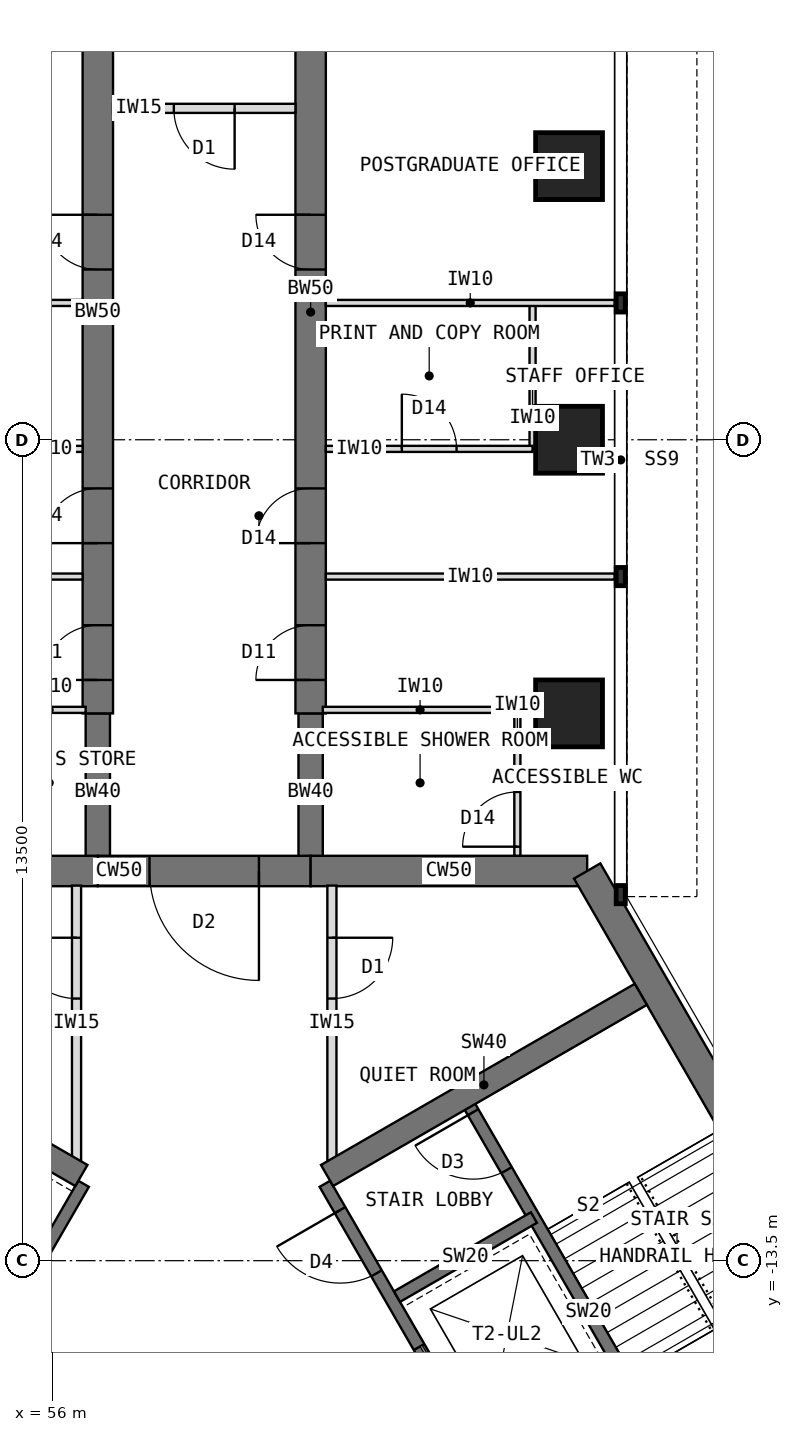
"""IFC4 building model, lengths in metres.
Left out: names, types, materials, properties, quantities, classifications, styles, units other than length and angle.
Written with IfcOpenShell. Run it as: python <this file> out.ifc"""

import sys

from ifc_helpers import new_model, si_unit, direction, frame, frame_2d, origin, origin_2d, place, context, subcontext, project, spatial, rectangle, extrude, element, fill, save


model = new_model("IFC4")
c1 = context("Model", 3, precision=1e-05, world=origin(), true_north=direction((0.0, 1.0)))
c2 = subcontext(c1, "Body", "Model", "MODEL_VIEW")
j1 = project(units=[si_unit("LENGTHUNIT", "METRE"), si_unit("PLANEANGLEUNIT", "RADIAN")], contexts=[c1])
p1 = place(None, origin())
s1 = spatial("IfcSite", under=j1, at=p1, CompositionType="ELEMENT")
p2 = place(p1, origin())
s2 = spatial("IfcBuilding", under=s1, at=p2, CompositionType="ELEMENT")
p3 = place(p2, frame((0.0, 0.0, 234.5)))
s3 = spatial("IfcBuildingStorey", under=s2, at=p3, CompositionType="ELEMENT", Elevation=234.5)
p4 = place(p3, frame((64.798, -7.092, 0.0), z_axis=(0.0, 0.0, 1.0), x_axis=(-1.0, 0.0, 0.0)))
e1 = element("IfcWall", 1, at=p4, inside=s3, PredefinedType="SHEAR", context=c2, shape_type="SweptSolid", body=[
    extrude(rectangle(XDim=4.548, YDim=0.5, at=frame_2d((2.274, 0.0))), origin(), (0.0, 0.0, 1.0), 4.0),
])
p5 = place(p3, frame((60.25, -7.092, 0.0), z_axis=(0.0, 0.0, 1.0), x_axis=(-1.0, 0.0, 0.0)))
e2 = element("IfcWall", 2, at=p5, inside=s3, PredefinedType="SHEAR", context=c2, shape_type="SweptSolid", body=[
    extrude(rectangle(XDim=3.5, YDim=0.5, at=frame_2d((1.75, 0.0))), origin(), (0.0, 0.0, 1.0), 4.0),
])
p6 = place(p5, frame((0.85, 0.0, 0.0)))
e3 = element("IfcOpeningElement", 3, at=p6, cuts=e2, PredefinedType="OPENING", context=c2, shape_type="SweptSolid", body=[
    extrude(rectangle(XDim=1.8, YDim=2.1, at=frame_2d((0.9, 1.05))), frame((0.0, 0.26, 0.0), z_axis=(0.0, -1.0, 0.0), x_axis=(1.0, 0.0, 0.0)), (0.0, 0.0, 1.0), 0.52),
])
p7 = place(p3, frame((56.75, -7.092, 0.0), z_axis=(0.0, 0.0, 1.0), x_axis=(-1.0, 0.0, 0.0)))
e4 = element("IfcWall", 4, at=p7, inside=s3, PredefinedType="SHEAR", context=c2, shape_type="SweptSolid", body=[
    extrude(rectangle(XDim=4.548, YDim=0.5, at=frame_2d((2.274, 0.0))), origin(), (0.0, 0.0, 1.0), 4.0),
])
p8 = place(p3, frame((71.096, -18.0, 0.0), z_axis=(0.0, 0.0, 1.0), x_axis=(-0.500005998175, 0.866021940709, 0.0)))
e5 = element("IfcWall", 5, at=p8, inside=s3, PredefinedType="SHEAR", context=c2, shape_type="SweptSolid", body=[
    extrude(rectangle(XDim=12.596, YDim=0.5, at=frame_2d((6.298, 0.0))), origin(), (0.0, 0.0, 1.0), 4.0),
])
p9 = place(p3, frame((56.75, -7.092, 0.0), z_axis=(0.0, 0.0, 1.0), x_axis=(0.0, 1.0, 0.0)))
e6 = element("IfcWall", 6, at=p9, inside=s3, PredefinedType="SHEAR", context=c2, shape_type="SweptSolid", body=[
    extrude(rectangle(XDim=2.592, YDim=0.4, at=frame_2d((1.296, 0.0))), origin(), (0.0, 0.0, 1.0), 4.0),
])
p10 = place(p3, frame((56.75, -4.5, 0.0), z_axis=(0.0, 0.0, 1.0), x_axis=(0.0, 1.0, 0.0)))
e7 = element("IfcWall", 7, at=p10, inside=s3, PredefinedType="SHEAR", context=c2, shape_type="SweptSolid", body=[
    extrude(rectangle(XDim=13.2, YDim=0.5, at=frame_2d((6.6, 0.0))), origin(), (0.0, 0.0, 1.0), 4.0),
])
p11 = place(p10, frame((0.55, 0.0, 0.0)))
e8 = element("IfcOpeningElement", 8, at=p11, cuts=e7, PredefinedType="OPENING", context=c2, shape_type="SweptSolid", body=[
    extrude(rectangle(XDim=0.9, YDim=2.1, at=frame_2d((0.45, 1.05))), frame((0.0, 0.26, 0.0), z_axis=(0.0, -1.0, 0.0), x_axis=(1.0, 0.0, 0.0)), (0.0, 0.0, 1.0), 0.52),
])
p12 = place(p10, frame((2.8, 0.0, 0.0)))
e9 = element("IfcOpeningElement", 9, at=p12, cuts=e7, PredefinedType="OPENING", context=c2, shape_type="SweptSolid", body=[
    extrude(rectangle(XDim=0.9, YDim=2.1, at=frame_2d((0.45, 1.05))), frame((0.0, 0.26, 0.0), z_axis=(0.0, -1.0, 0.0), x_axis=(1.0, 0.0, 0.0)), (0.0, 0.0, 1.0), 0.52),
])
p13 = place(p10, frame((7.3, 0.0, 0.0)))
e10 = element("IfcOpeningElement", 10, at=p13, cuts=e7, PredefinedType="OPENING", context=c2, shape_type="SweptSolid", body=[
    extrude(rectangle(XDim=0.9, YDim=2.1, at=frame_2d((0.45, 1.05))), frame((0.0, 0.26, 0.0), z_axis=(0.0, -1.0, 0.0), x_axis=(1.0, 0.0, 0.0)), (0.0, 0.0, 1.0), 0.52),
])
p14 = place(p3, frame((60.25, -7.092, 0.0), z_axis=(0.0, 0.0, 1.0), x_axis=(0.0, 1.0, 0.0)))
e11 = element("IfcWall", 11, at=p14, inside=s3, PredefinedType="SHEAR", context=c2, shape_type="SweptSolid", body=[
    extrude(rectangle(XDim=2.592, YDim=0.4, at=frame_2d((1.296, 0.0))), origin(), (0.0, 0.0, 1.0), 4.0),
])
p15 = place(p3, frame((60.25, -4.5, 0.0), z_axis=(0.0, 0.0, 1.0), x_axis=(0.0, 1.0, 0.0)))
e12 = element("IfcWall", 12, at=p15, inside=s3, PredefinedType="SHEAR", context=c2, shape_type="SweptSolid", body=[
    extrude(rectangle(XDim=13.2, YDim=0.5, at=frame_2d((6.6, 0.0))), origin(), (0.0, 0.0, 1.0), 4.0),
])
p16 = place(p15, frame((0.55, 0.0, 0.0)))
e13 = element("IfcOpeningElement", 13, at=p16, cuts=e12, PredefinedType="OPENING", context=c2, shape_type="SweptSolid", body=[
    extrude(rectangle(XDim=0.9, YDim=2.1, at=frame_2d((0.45, 1.05))), frame((0.0, 0.26, 0.0), z_axis=(0.0, -1.0, 0.0), x_axis=(1.0, 0.0, 0.0)), (0.0, 0.0, 1.0), 0.52),
])
p17 = place(p15, frame((2.8, 0.0, 0.0)))
e14 = element("IfcOpeningElement", 14, at=p17, cuts=e12, PredefinedType="OPENING", context=c2, shape_type="SweptSolid", body=[
    extrude(rectangle(XDim=0.9, YDim=2.1, at=frame_2d((0.45, 1.05))), frame((0.0, 0.26, 0.0), z_axis=(0.0, -1.0, 0.0), x_axis=(1.0, 0.0, 0.0)), (0.0, 0.0, 1.0), 0.52),
])
p18 = place(p15, frame((7.3, 0.0, 0.0)))
e15 = element("IfcOpeningElement", 15, at=p18, cuts=e12, PredefinedType="OPENING", context=c2, shape_type="SweptSolid", body=[
    extrude(rectangle(XDim=0.9, YDim=2.1, at=frame_2d((0.45, 1.05))), frame((0.0, 0.26, 0.0), z_axis=(0.0, -1.0, 0.0), x_axis=(1.0, 0.0, 0.0)), (0.0, 0.0, 1.0), 0.52),
])
for number, where, z_axis, x_axis in (
    (16, (64.5, -4.5, 0.0), (0.0, 0.0, 1.0), (1.0, 0.0, 0.0)),
    (17, (64.5, 0.0, 0.0), (0.0, 0.0, 1.0), (1.0, 0.0, 0.0)),
    (18, (64.5, 4.5, 0.0), (0.0, 0.0, 1.0), (1.0, 0.0, 0.0)),
):
    element("IfcColumn", number, at=place(p3, frame(where, z_axis=z_axis, x_axis=x_axis)), inside=s3, PredefinedType="COLUMN", context=c2, shape_type="SweptSolid", body=[
        extrude(rectangle(XDim=1.1, YDim=1.1, at=origin_2d()), origin(), (0.0, 0.0, 1.0), 4.0),
    ])
p19 = place(p3, frame((56.516, -12.236, 0.0), z_axis=(0.0, 0.0, 1.0), x_axis=(-0.49999894854, -0.866026010844, 0.0)))
e19 = element("IfcWall", 19, at=p19, inside=s3, PredefinedType="SHEAR", context=c2, shape_type="SweptSolid", body=[
    extrude(rectangle(XDim=8.0, YDim=0.2, at=frame_2d((4.0, 0.0))), origin(), (0.0, 0.0, 1.0), 4.0),
])
p20 = place(p19, frame((6.3, 0.0, 0.0)))
e20 = element("IfcOpeningElement", 20, at=p20, cuts=e19, PredefinedType="OPENING", context=c2, shape_type="SweptSolid", body=[
    extrude(rectangle(XDim=1.2, YDim=2.1, at=frame_2d((0.6, 1.05))), frame((0.0, 0.11, 0.0), z_axis=(0.0, -1.0, 0.0), x_axis=(1.0, 0.0, 0.0)), (0.0, 0.0, 1.0), 0.22),
])
p21 = place(p3, frame((56.48, -12.099, 0.0), z_axis=(0.0, 0.0, 1.0), x_axis=(-0.86602319114, 0.500003832394, 0.0)))
e21 = element("IfcWall", 21, at=p21, inside=s3, PredefinedType="SHEAR", context=c2, shape_type="SweptSolid", body=[
    extrude(rectangle(XDim=5.958, YDim=0.4, at=frame_2d((2.979, 0.0))), origin(), (0.0, 0.0, 1.0), 4.0),
])
p22 = place(p3, frame((64.484, -19.164, 0.0), z_axis=(0.0, 0.0, 1.0), x_axis=(-0.49999894854, 0.866026010844, 0.0)))
e22 = element("IfcWall", 22, at=p22, inside=s3, PredefinedType="SHEAR", context=c2, shape_type="SweptSolid", body=[
    extrude(rectangle(XDim=8.0, YDim=0.2, at=frame_2d((4.0, 0.0))), origin(), (0.0, 0.0, 1.0), 4.0),
])
p23 = place(p22, frame((6.3, 0.0, 0.0)))
e23 = element("IfcOpeningElement", 23, at=p23, cuts=e22, PredefinedType="OPENING", context=c2, shape_type="SweptSolid", body=[
    extrude(rectangle(XDim=1.2, YDim=2.1, at=frame_2d((0.6, 1.05))), frame((0.0, 0.11, 0.0), z_axis=(0.0, -1.0, 0.0), x_axis=(1.0, 0.0, 0.0)), (0.0, 0.0, 1.0), 0.22),
])
p24 = place(p22, frame((0.9, 0.0, 0.0)))
e24 = element("IfcOpeningElement", 24, at=p24, cuts=e22, PredefinedType="OPENING", context=c2, shape_type="SweptSolid", body=[
    extrude(rectangle(XDim=1.1, YDim=2.2, at=frame_2d((0.55, 1.1))), frame((0.0, 0.11, 0.0), z_axis=(0.0, -1.0, 0.0), x_axis=(1.0, 0.0, 0.0)), (0.0, 0.0, 1.0), 0.22),
])
p25 = place(p22, frame((3.8, 0.0, 0.0)))
e25 = element("IfcOpeningElement", 25, at=p25, cuts=e22, PredefinedType="OPENING", context=c2, shape_type="SweptSolid", body=[
    extrude(rectangle(XDim=1.1, YDim=2.2, at=frame_2d((0.55, 1.1))), frame((0.0, 0.11, 0.0), z_axis=(0.0, -1.0, 0.0), x_axis=(1.0, 0.0, 0.0)), (0.0, 0.0, 1.0), 0.22),
])
p26 = place(p3, frame((61.67, -14.091, 0.0), z_axis=(0.0, 0.0, 1.0), x_axis=(0.86603858612, 0.49997716683, 0.0)))
e26 = element("IfcWall", 26, at=p26, inside=s3, PredefinedType="SHEAR", context=c2, shape_type="SweptSolid", body=[
    extrude(rectangle(XDim=2.6, YDim=0.2, at=frame_2d((1.3, 0.0))), origin(), (0.0, 0.0, 1.0), 4.0),
])
p27 = place(p3, frame((66.822, -17.814, 0.0), z_axis=(0.0, 0.0, 1.0), x_axis=(-0.49999894854, 0.866026010844, 0.0)))
e27 = element("IfcWall", 27, at=p27, inside=s3, PredefinedType="SHEAR", context=c2, shape_type="SweptSolid", body=[
    extrude(rectangle(XDim=8.0, YDim=0.2, at=frame_2d((4.0, 0.0))), origin(), (0.0, 0.0, 1.0), 4.0),
])
p28 = place(p27, frame((6.7, 0.0, 0.0)))
e28 = element("IfcOpeningElement", 28, at=p28, cuts=e27, PredefinedType="OPENING", context=c2, shape_type="SweptSolid", body=[
    extrude(rectangle(XDim=1.1, YDim=2.1, at=frame_2d((0.55, 1.05))), frame((0.0, 0.11, 0.0), z_axis=(0.0, -1.0, 0.0), x_axis=(1.0, 0.0, 0.0)), (0.0, 0.0, 1.0), 0.22),
])
p29 = place(p3, frame((60.52, -12.099, 0.0), z_axis=(0.0, 0.0, 1.0), x_axis=(0.86602319114, 0.500003832394, 0.0)))
e29 = element("IfcWall", 29, at=p29, inside=s3, PredefinedType="SHEAR", context=c2, shape_type="SweptSolid", body=[
    extrude(rectangle(XDim=5.958, YDim=0.4, at=frame_2d((2.979, 0.0))), origin(), (0.0, 0.0, 1.0), 4.0),
])
for number, where, z_axis, x_axis in (
    (30, (56.5, -2.25, 0.0), (0.0, 0.0, 1.0), (-1.0, 0.0, 0.0)),
    (31, (56.5, 2.25, 0.0), (0.0, 0.0, 1.0), (-1.0, 0.0, 0.0)),
):
    element("IfcWall", number, at=place(p3, frame(where, z_axis=z_axis, x_axis=x_axis)), inside=s3, PredefinedType="PARTITIONING", context=c2, shape_type="SweptSolid", body=[
        extrude(rectangle(XDim=4.75, YDim=0.1, at=frame_2d((2.375, 0.0))), origin(), (0.0, 0.0, 1.0), 3.7),
    ])
p30 = place(p3, frame((56.5, -0.15, 0.0), z_axis=(0.0, 0.0, 1.0), x_axis=(-1.0, 0.0, 0.0)))
e32 = element("IfcWall", 32, at=p30, inside=s3, PredefinedType="PARTITIONING", context=c2, shape_type="SweptSolid", body=[
    extrude(rectangle(XDim=3.4, YDim=0.1, at=frame_2d((1.7, 0.0))), origin(), (0.0, 0.0, 1.0), 3.7),
])
p31 = place(p30, frame((1.25, 0.0, 0.0)))
e33 = element("IfcOpeningElement", 33, at=p31, cuts=e32, PredefinedType="OPENING", context=c2, shape_type="SweptSolid", body=[
    extrude(rectangle(XDim=0.9, YDim=2.1, at=frame_2d((0.45, 1.05))), frame((0.0, 0.06, 0.0), z_axis=(0.0, -1.0, 0.0), x_axis=(1.0, 0.0, 0.0)), (0.0, 0.0, 1.0), 0.12),
])
p32 = place(p3, frame((56.55, -4.442, 0.0), z_axis=(0.0, 0.0, 1.0), x_axis=(-1.0, 0.0, 0.0)))
e34 = element("IfcWall", 34, at=p32, inside=s3, PredefinedType="PARTITIONING", context=c2, shape_type="SweptSolid", body=[
    extrude(rectangle(XDim=1.2, YDim=0.1, at=frame_2d((0.6, 0.0))), origin(), (0.0, 0.0, 1.0), 3.167),
])
for number, where, z_axis, x_axis in (
    (35, (60.5, -2.25, 0.0), (0.0, 0.0, 1.0), (1.0, 0.0, 0.0)),
    (36, (60.5, 2.25, 0.0), (0.0, 0.0, 1.0), (1.0, 0.0, 0.0)),
):
    element("IfcWall", number, at=place(p3, frame(where, z_axis=z_axis, x_axis=x_axis)), inside=s3, PredefinedType="PARTITIONING", context=c2, shape_type="SweptSolid", body=[
        extrude(rectangle(XDim=4.75, YDim=0.1, at=frame_2d((2.375, 0.0))), origin(), (0.0, 0.0, 1.0), 3.7),
    ])
p33 = place(p3, frame((63.9, -0.15, 0.0), z_axis=(0.0, 0.0, 1.0), x_axis=(0.0, 1.0, 0.0)))
e37 = element("IfcWall", 37, at=p33, inside=s3, PredefinedType="PARTITIONING", context=c2, shape_type="SweptSolid", body=[
    extrude(rectangle(XDim=2.4, YDim=0.1, at=frame_2d((1.2, 0.0))), origin(), (0.0, 0.0, 1.0), 3.7),
])
p34 = place(p3, frame((60.5, -0.15, 0.0), z_axis=(0.0, 0.0, 1.0), x_axis=(1.0, 0.0, 0.0)))
e38 = element("IfcWall", 38, at=p34, inside=s3, PredefinedType="PARTITIONING", context=c2, shape_type="SweptSolid", body=[
    extrude(rectangle(XDim=3.4, YDim=0.1, at=frame_2d((1.7, 0.0))), origin(), (0.0, 0.0, 1.0), 3.7),
])
p35 = place(p34, frame((1.25, 0.0, 0.0)))
e39 = element("IfcOpeningElement", 39, at=p35, cuts=e38, PredefinedType="OPENING", context=c2, shape_type="SweptSolid", body=[
    extrude(rectangle(XDim=0.9, YDim=2.1, at=frame_2d((0.45, 1.05))), frame((0.0, 0.06, 0.0), z_axis=(0.0, -1.0, 0.0), x_axis=(1.0, 0.0, 0.0)), (0.0, 0.0, 1.0), 0.12),
])
p36 = place(p3, frame((63.65, -6.842, 0.0), z_axis=(0.0, 0.0, 1.0), x_axis=(0.0, 1.0, 0.0)))
e40 = element("IfcWall", 40, at=p36, inside=s3, PredefinedType="PARTITIONING", context=c2, shape_type="SweptSolid", body=[
    extrude(rectangle(XDim=2.4, YDim=0.1, at=frame_2d((1.2, 0.0))), origin(), (0.0, 0.0, 1.0), 3.7),
])
p37 = place(p36, frame((0.15, 0.0, 0.0)))
e41 = element("IfcOpeningElement", 41, at=p37, cuts=e40, PredefinedType="OPENING", context=c2, shape_type="SweptSolid", body=[
    extrude(rectangle(XDim=0.9, YDim=2.1, at=frame_2d((0.45, 1.05))), frame((0.0, 0.06, 0.0), z_axis=(0.0, -1.0, 0.0), x_axis=(1.0, 0.0, 0.0)), (0.0, 0.0, 1.0), 0.12),
])
p38 = place(p3, frame((60.45, -4.442, 0.0), z_axis=(0.0, 0.0, 1.0), x_axis=(1.0, 0.0, 0.0)))
e42 = element("IfcWall", 42, at=p38, inside=s3, PredefinedType="PARTITIONING", context=c2, shape_type="SweptSolid", body=[
    extrude(rectangle(XDim=3.2, YDim=0.1, at=frame_2d((1.6, 0.0))), origin(), (0.0, 0.0, 1.0), 3.167),
])
p39 = place(p3, frame((56.4, -11.857, 0.0), z_axis=(0.0, 0.0, 1.0), x_axis=(0.0, 1.0, 0.0)))
e43 = element("IfcWall", 43, at=p39, inside=s3, PredefinedType="PARTITIONING", context=c2, shape_type="SweptSolid", body=[
    extrude(rectangle(XDim=4.526, YDim=0.15, at=frame_2d((2.263, 0.0))), origin(), (0.0, 0.0, 1.0), 3.7),
])
p40 = place(p39, frame((2.668, 0.0, 0.0)))
e44 = element("IfcOpeningElement", 44, at=p40, cuts=e43, PredefinedType="OPENING", context=c2, shape_type="SweptSolid", body=[
    extrude(rectangle(XDim=1.0, YDim=2.1, at=frame_2d((0.5, 1.05))), frame((0.0, 0.085, 0.0), z_axis=(0.0, -1.0, 0.0), x_axis=(1.0, 0.0, 0.0)), (0.0, 0.0, 1.0), 0.17),
])
p41 = place(p3, frame((60.6, -7.332, 0.0), z_axis=(0.0, 0.0, 1.0), x_axis=(0.0, -1.0, 0.0)))
e45 = element("IfcWall", 45, at=p41, inside=s3, PredefinedType="PARTITIONING", context=c2, shape_type="SweptSolid", body=[
    extrude(rectangle(XDim=4.526, YDim=0.15, at=frame_2d((2.263, 0.0))), origin(), (0.0, 0.0, 1.0), 3.7),
])
p42 = place(p41, frame((0.858, 0.0, 0.0)))
e46 = element("IfcOpeningElement", 46, at=p42, cuts=e45, PredefinedType="OPENING", context=c2, shape_type="SweptSolid", body=[
    extrude(rectangle(XDim=1.0, YDim=2.1, at=frame_2d((0.5, 1.05))), frame((0.0, 0.085, 0.0), z_axis=(0.0, -1.0, 0.0), x_axis=(1.0, 0.0, 0.0)), (0.0, 0.0, 1.0), 0.17),
])
p43 = place(p3, frame((60.0, 5.45, 0.0), z_axis=(0.0, 0.0, 1.0), x_axis=(-1.0, 0.0, 0.0)))
e47 = element("IfcWall", 47, at=p43, inside=s3, PredefinedType="PARTITIONING", context=c2, shape_type="SweptSolid", body=[
    extrude(rectangle(XDim=3.0, YDim=0.15, at=frame_2d((1.5, 0.0))), origin(), (0.0, 0.0, 1.0), 3.7),
])
p44 = place(p43, frame((1.0, 0.0, 0.0)))
e48 = element("IfcOpeningElement", 48, at=p44, cuts=e47, PredefinedType="OPENING", context=c2, shape_type="SweptSolid", body=[
    extrude(rectangle(XDim=1.0, YDim=2.1, at=frame_2d((0.5, 1.05))), frame((0.0, 0.085, 0.0), z_axis=(0.0, -1.0, 0.0), x_axis=(1.0, 0.0, 0.0)), (0.0, 0.0, 1.0), 0.17),
])
p45 = place(p23, origin())
e49 = element("IfcDoor", 49, at=p45, inside=s3, OperationType="SINGLE_SWING_RIGHT", PredefinedType="DOOR", context=c2, shape_type="SweptSolid", body=[
    extrude(rectangle(XDim=1.2, YDim=2.1, at=frame_2d((0.6, 1.05))), frame((0.0, 0.025, 0.0), z_axis=(0.0, -1.0, 0.0), x_axis=(1.0, 0.0, 0.0)), (0.0, 0.0, 1.0), 0.05),
])
fill(e23, e49)
p46 = place(p25, origin())
e50 = element("IfcDoor", 50, at=p46, inside=s3, OperationType="DOUBLE_DOOR_SLIDING", PredefinedType="DOOR", context=c2, shape_type="SweptSolid", body=[
    extrude(rectangle(XDim=1.1, YDim=2.2, at=frame_2d((0.55, 1.1))), frame((0.0, 0.025, 0.0), z_axis=(0.0, -1.0, 0.0), x_axis=(1.0, 0.0, 0.0)), (0.0, 0.0, 1.0), 0.05),
])
fill(e25, e50)
p47 = place(p28, origin())
e51 = element("IfcDoor", 51, at=p47, inside=s3, OperationType="SINGLE_SWING_RIGHT", PredefinedType="DOOR", context=c2, shape_type="SweptSolid", body=[
    extrude(rectangle(XDim=1.1, YDim=2.1, at=frame_2d((0.55, 1.05))), frame((0.0, 0.025, 0.0), z_axis=(0.0, -1.0, 0.0), x_axis=(1.0, 0.0, 0.0)), (0.0, 0.0, 1.0), 0.05),
])
fill(e28, e51)
p48 = place(p6, origin())
e52 = element("IfcDoor", 52, at=p48, inside=s3, OperationType="DOUBLE_DOOR_DOUBLE_SWING", PredefinedType="DOOR", context=c2, shape_type="SweptSolid", body=[
    extrude(rectangle(XDim=1.8, YDim=2.1, at=frame_2d((0.9, 1.05))), frame((0.0, 0.025, 0.0), z_axis=(0.0, -1.0, 0.0), x_axis=(1.0, 0.0, 0.0)), (0.0, 0.0, 1.0), 0.05),
])
fill(e3, e52)
p49 = place(p35, origin())
e53 = element("IfcDoor", 53, at=p49, inside=s3, OperationType="SINGLE_SWING_LEFT", PredefinedType="DOOR", context=c2, shape_type="SweptSolid", body=[
    extrude(rectangle(XDim=0.9, YDim=2.1, at=frame_2d((0.45, 1.05))), frame((0.0, 0.025, 0.0), z_axis=(0.0, -1.0, 0.0), x_axis=(1.0, 0.0, 0.0)), (0.0, 0.0, 1.0), 0.05),
])
fill(e39, e53)
p50 = place(p37, origin())
e54 = element("IfcDoor", 54, at=p50, inside=s3, OperationType="SINGLE_SWING_LEFT", PredefinedType="DOOR", context=c2, shape_type="SweptSolid", body=[
    extrude(rectangle(XDim=0.9, YDim=2.1, at=frame_2d((0.45, 1.05))), frame((0.0, 0.025, 0.0), z_axis=(0.0, -1.0, 0.0), x_axis=(1.0, 0.0, 0.0)), (0.0, 0.0, 1.0), 0.05),
])
fill(e41, e54)
p51 = place(p42, origin())
e55 = element("IfcDoor", 55, at=p51, inside=s3, OperationType="SINGLE_SWING_LEFT", PredefinedType="DOOR", context=c2, shape_type="SweptSolid", body=[
    extrude(rectangle(XDim=1.0, YDim=2.1, at=frame_2d((0.5, 1.05))), frame((0.0, 0.025, 0.0), z_axis=(0.0, -1.0, 0.0), x_axis=(1.0, 0.0, 0.0)), (0.0, 0.0, 1.0), 0.05),
])
fill(e46, e55)
p52 = place(p40, origin())
e56 = element("IfcDoor", 56, at=p52, inside=s3, OperationType="SINGLE_SWING_RIGHT", PredefinedType="DOOR", context=c2, shape_type="SweptSolid", body=[
    extrude(rectangle(XDim=1.0, YDim=2.1, at=frame_2d((0.5, 1.05))), frame((0.0, 0.025, 0.0), z_axis=(0.0, -1.0, 0.0), x_axis=(1.0, 0.0, 0.0)), (0.0, 0.0, 1.0), 0.05),
])
fill(e44, e56)
p53 = place(p44, origin())
e57 = element("IfcDoor", 57, at=p53, inside=s3, OperationType="SINGLE_SWING_LEFT", PredefinedType="DOOR", context=c2, shape_type="SweptSolid", body=[
    extrude(rectangle(XDim=1.0, YDim=2.1, at=frame_2d((0.5, 1.05))), frame((0.0, 0.025, 0.0), z_axis=(0.0, -1.0, 0.0), x_axis=(1.0, 0.0, 0.0)), (0.0, 0.0, 1.0), 0.05),
])
fill(e48, e57)
p54 = place(p11, origin())
e58 = element("IfcDoor", 58, at=p54, inside=s3, OperationType="SINGLE_SWING_LEFT", PredefinedType="DOOR", context=c2, shape_type="SweptSolid", body=[
    extrude(rectangle(XDim=0.9, YDim=2.1, at=frame_2d((0.45, 1.05))), frame((0.0, 0.025, 0.0), z_axis=(0.0, -1.0, 0.0), x_axis=(1.0, 0.0, 0.0)), (0.0, 0.0, 1.0), 0.05),
])
fill(e8, e58)
p55 = place(p12, origin())
e59 = element("IfcDoor", 59, at=p55, inside=s3, OperationType="SINGLE_SWING_LEFT", PredefinedType="DOOR", context=c2, shape_type="SweptSolid", body=[
    extrude(rectangle(XDim=0.9, YDim=2.1, at=frame_2d((0.45, 1.05))), frame((0.0, 0.025, 0.0), z_axis=(0.0, -1.0, 0.0), x_axis=(1.0, 0.0, 0.0)), (0.0, 0.0, 1.0), 0.05),
])
fill(e9, e59)
p56 = place(p13, origin())
e60 = element("IfcDoor", 60, at=p56, inside=s3, OperationType="SINGLE_SWING_RIGHT", PredefinedType="DOOR", context=c2, shape_type="SweptSolid", body=[
    extrude(rectangle(XDim=0.9, YDim=2.1, at=frame_2d((0.45, 1.05))), frame((0.0, 0.025, 0.0), z_axis=(0.0, -1.0, 0.0), x_axis=(1.0, 0.0, 0.0)), (0.0, 0.0, 1.0), 0.05),
])
fill(e10, e60)
p57 = place(p16, origin())
e61 = element("IfcDoor", 61, at=p57, inside=s3, OperationType="SINGLE_SWING_LEFT", PredefinedType="DOOR", context=c2, shape_type="SweptSolid", body=[
    extrude(rectangle(XDim=0.9, YDim=2.1, at=frame_2d((0.45, 1.05))), frame((0.0, 0.025, 0.0), z_axis=(0.0, -1.0, 0.0), x_axis=(1.0, 0.0, 0.0)), (0.0, 0.0, 1.0), 0.05),
])
fill(e13, e61)
p58 = place(p17, origin())
e62 = element("IfcDoor", 62, at=p58, inside=s3, OperationType="SINGLE_SWING_LEFT", PredefinedType="DOOR", context=c2, shape_type="SweptSolid", body=[
    extrude(rectangle(XDim=0.9, YDim=2.1, at=frame_2d((0.45, 1.05))), frame((0.0, 0.025, 0.0), z_axis=(0.0, -1.0, 0.0), x_axis=(1.0, 0.0, 0.0)), (0.0, 0.0, 1.0), 0.05),
])
fill(e14, e62)
p59 = place(p18, origin())
e63 = element("IfcDoor", 63, at=p59, inside=s3, OperationType="SINGLE_SWING_RIGHT", PredefinedType="DOOR", context=c2, shape_type="SweptSolid", body=[
    extrude(rectangle(XDim=0.9, YDim=2.1, at=frame_2d((0.45, 1.05))), frame((0.0, 0.025, 0.0), z_axis=(0.0, -1.0, 0.0), x_axis=(1.0, 0.0, 0.0)), (0.0, 0.0, 1.0), 0.05),
])
fill(e15, e63)
save(model, sys.argv[1])
